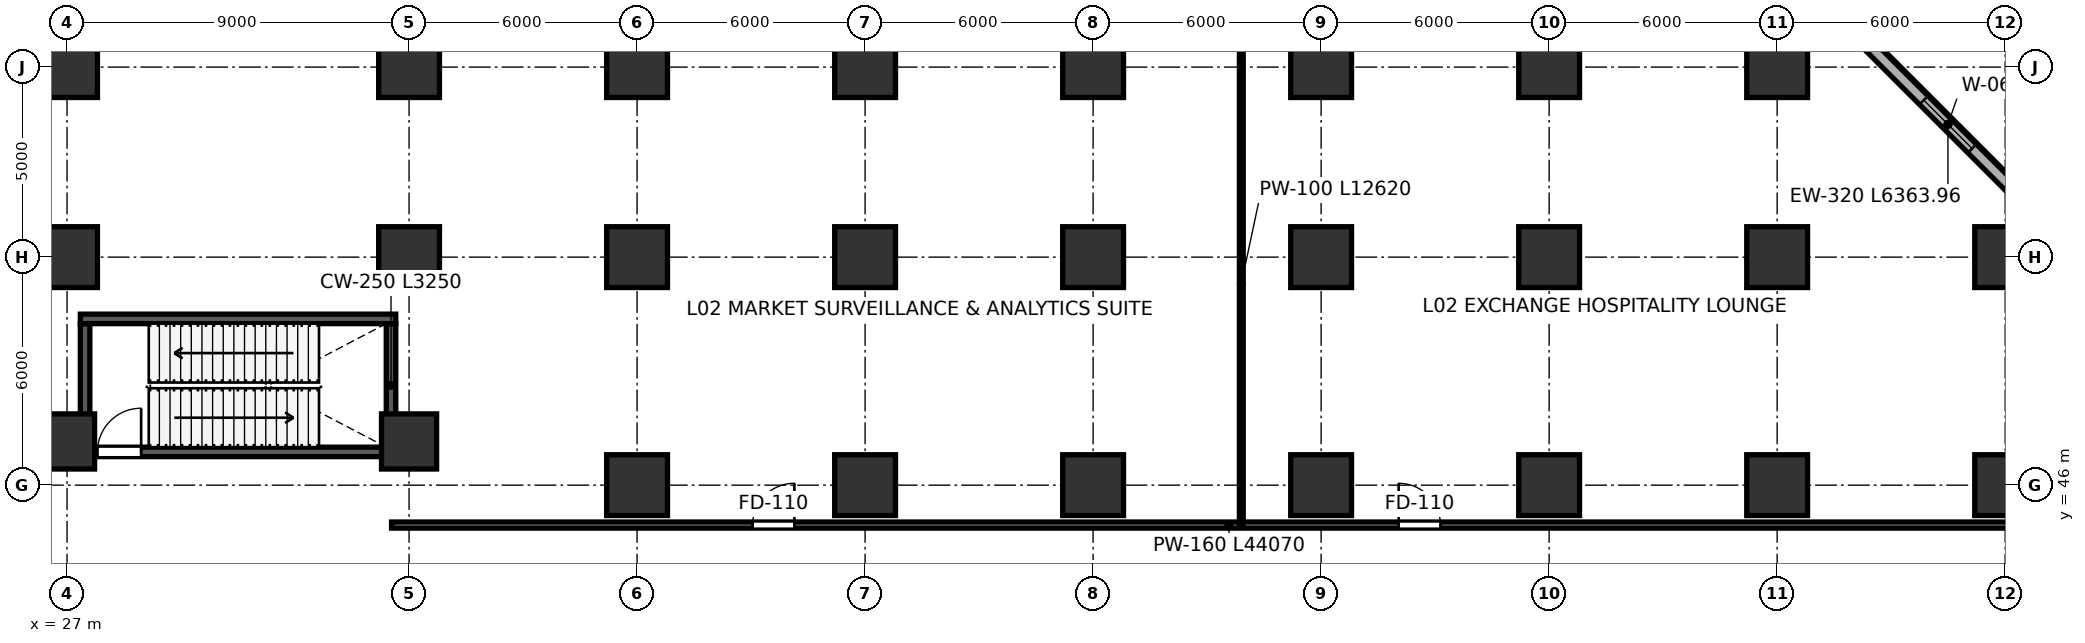
"""IFC4 building model, lengths in metres.
Left out: names, types, materials, properties, quantities, classifications, styles, units other than length and angle.
Written with IfcOpenShell. Run it as: python <this file> out.ifc"""

import sys

from ifc_helpers import new_model, si_unit, direction, frame, frame_2d, origin, origin_2d, place, context, subcontext, project, spatial, rectangle, extrude, source, transform, mapped, element, fill, save


model = new_model("IFC4")
c1 = context("Model", 3, precision=1e-05, world=origin(), true_north=direction((0.0, 1.0)))
c2 = subcontext(c1, "Body", "Model", "MODEL_VIEW")
j1 = project(units=[si_unit("LENGTHUNIT", "METRE"), si_unit("PLANEANGLEUNIT", "RADIAN")], contexts=[c1])
p1 = place(None, origin())
s1 = spatial("IfcSite", under=j1, at=p1, CompositionType="ELEMENT")
p2 = place(p1, origin())
s2 = spatial("IfcBuilding", under=s1, at=p2, CompositionType="ELEMENT")
p3 = place(p2, frame((0.0, 0.0, 6.0)))
s3 = spatial("IfcBuildingStorey", under=s2, at=p3, CompositionType="ELEMENT", Elevation=6.0)
m1 = source(origin(), c2, "Body", "SweptSolid", [
    extrude(rectangle(XDim=1.6, YDim=1.6, at=origin_2d()), origin(), (0.0, 0.0, 1.0), 5.999),
])
p4 = place(p3, frame((27.0, 52.0, 0.001), z_axis=(0.0, 0.0, 1.0), x_axis=(1.0, 0.0, 0.0)))
e1 = element("IfcColumn", 1, at=p4, inside=s3, PredefinedType="COLUMN", context=c2, shape_type="MappedRepresentation", body=[
    mapped(m1, transform((0.0, 0.0, 0.0), scale=1.0)),
])
m2 = source(origin(), c2, "Body", "SweptSolid", [
    extrude(rectangle(XDim=1.6, YDim=1.6, at=origin_2d()), origin(), (0.0, 0.0, 1.0), 5.999),
])
p5 = place(p3, frame((27.0, 57.0, 0.001), z_axis=(0.0, 0.0, 1.0), x_axis=(1.0, 0.0, 0.0)))
e2 = element("IfcColumn", 2, at=p5, inside=s3, PredefinedType="COLUMN", context=c2, shape_type="MappedRepresentation", body=[
    mapped(m2, transform((0.0, 0.0, 0.0), scale=1.0)),
])
m3 = source(origin(), c2, "Body", "SweptSolid", [
    extrude(rectangle(XDim=1.45, YDim=1.45, at=origin_2d()), origin(), (0.0, 0.0, 1.0), 5.999),
])
p6 = place(p3, frame((27.0, 47.15, 0.001), z_axis=(0.0, 0.0, 1.0), x_axis=(1.0, 0.0, 0.0)))
e3 = element("IfcColumn", 3, at=p6, inside=s3, PredefinedType="COLUMN", context=c2, shape_type="MappedRepresentation", body=[
    mapped(m3, transform((0.0, 0.0, 0.0), scale=1.0)),
])
p7 = place(p3, frame((36.0, 52.0, 0.001), z_axis=(0.0, 0.0, 1.0), x_axis=(1.0, 0.0, 0.0)))
e4 = element("IfcColumn", 4, at=p7, inside=s3, PredefinedType="COLUMN", context=c2, shape_type="MappedRepresentation", body=[
    mapped(m1, transform((0.0, 0.0, 0.0), scale=1.0)),
])
p8 = place(p3, frame((36.0, 57.0, 0.001), z_axis=(0.0, 0.0, 1.0), x_axis=(1.0, 0.0, 0.0)))
e5 = element("IfcColumn", 5, at=p8, inside=s3, PredefinedType="COLUMN", context=c2, shape_type="MappedRepresentation", body=[
    mapped(m2, transform((0.0, 0.0, 0.0), scale=1.0)),
])
p9 = place(p3, frame((36.0, 47.15, 0.001), z_axis=(0.0, 0.0, 1.0), x_axis=(1.0, 0.0, 0.0)))
e6 = element("IfcColumn", 6, at=p9, inside=s3, PredefinedType="COLUMN", context=c2, shape_type="MappedRepresentation", body=[
    mapped(m3, transform((0.0, 0.0, 0.0), scale=1.0)),
])
for number, where, z_axis, x_axis in (
    (7, (42.0, 46.0, 0.001), (0.0, 0.0, 1.0), (1.0, 0.0, 0.0)),
    (8, (42.0, 52.0, 0.001), (0.0, 0.0, 1.0), (1.0, 0.0, 0.0)),
):
    element("IfcColumn", number, at=place(p3, frame(where, z_axis=z_axis, x_axis=x_axis)), inside=s3, PredefinedType="COLUMN", context=c2, shape_type="MappedRepresentation", body=[
        mapped(m1, transform((0.0, 0.0, 0.0), scale=1.0)),
    ])
p10 = place(p3, frame((42.0, 57.0, 0.001), z_axis=(0.0, 0.0, 1.0), x_axis=(1.0, 0.0, 0.0)))
e9 = element("IfcColumn", 9, at=p10, inside=s3, PredefinedType="COLUMN", context=c2, shape_type="MappedRepresentation", body=[
    mapped(m2, transform((0.0, 0.0, 0.0), scale=1.0)),
])
for number, where, z_axis, x_axis in (
    (10, (48.0, 46.0, 0.001), (0.0, 0.0, 1.0), (1.0, 0.0, 0.0)),
    (11, (48.0, 52.0, 0.001), (0.0, 0.0, 1.0), (1.0, 0.0, 0.0)),
):
    element("IfcColumn", number, at=place(p3, frame(where, z_axis=z_axis, x_axis=x_axis)), inside=s3, PredefinedType="COLUMN", context=c2, shape_type="MappedRepresentation", body=[
        mapped(m1, transform((0.0, 0.0, 0.0), scale=1.0)),
    ])
p11 = place(p3, frame((48.0, 57.0, 0.001), z_axis=(0.0, 0.0, 1.0), x_axis=(1.0, 0.0, 0.0)))
e12 = element("IfcColumn", 12, at=p11, inside=s3, PredefinedType="COLUMN", context=c2, shape_type="MappedRepresentation", body=[
    mapped(m2, transform((0.0, 0.0, 0.0), scale=1.0)),
])
for number, where, z_axis, x_axis in (
    (13, (54.0, 46.0, 0.001), (0.0, 0.0, 1.0), (1.0, 0.0, 0.0)),
    (14, (54.0, 52.0, 0.001), (0.0, 0.0, 1.0), (1.0, 0.0, 0.0)),
):
    element("IfcColumn", number, at=place(p3, frame(where, z_axis=z_axis, x_axis=x_axis)), inside=s3, PredefinedType="COLUMN", context=c2, shape_type="MappedRepresentation", body=[
        mapped(m1, transform((0.0, 0.0, 0.0), scale=1.0)),
    ])
p12 = place(p3, frame((54.0, 57.0, 0.001), z_axis=(0.0, 0.0, 1.0), x_axis=(1.0, 0.0, 0.0)))
e15 = element("IfcColumn", 15, at=p12, inside=s3, PredefinedType="COLUMN", context=c2, shape_type="MappedRepresentation", body=[
    mapped(m2, transform((0.0, 0.0, 0.0), scale=1.0)),
])
for number, where, z_axis, x_axis in (
    (16, (60.0, 46.0, 0.001), (0.0, 0.0, 1.0), (1.0, 0.0, 0.0)),
    (17, (60.0, 52.0, 0.001), (0.0, 0.0, 1.0), (1.0, 0.0, 0.0)),
):
    element("IfcColumn", number, at=place(p3, frame(where, z_axis=z_axis, x_axis=x_axis)), inside=s3, PredefinedType="COLUMN", context=c2, shape_type="MappedRepresentation", body=[
        mapped(m1, transform((0.0, 0.0, 0.0), scale=1.0)),
    ])
p13 = place(p3, frame((60.0, 57.0, 0.001), z_axis=(0.0, 0.0, 1.0), x_axis=(1.0, 0.0, 0.0)))
e18 = element("IfcColumn", 18, at=p13, inside=s3, PredefinedType="COLUMN", context=c2, shape_type="MappedRepresentation", body=[
    mapped(m2, transform((0.0, 0.0, 0.0), scale=1.0)),
])
for number, where, z_axis, x_axis in (
    (19, (66.0, 46.0, 0.001), (0.0, 0.0, 1.0), (1.0, 0.0, 0.0)),
    (20, (66.0, 52.0, 0.001), (0.0, 0.0, 1.0), (1.0, 0.0, 0.0)),
):
    element("IfcColumn", number, at=place(p3, frame(where, z_axis=z_axis, x_axis=x_axis)), inside=s3, PredefinedType="COLUMN", context=c2, shape_type="MappedRepresentation", body=[
        mapped(m1, transform((0.0, 0.0, 0.0), scale=1.0)),
    ])
p14 = place(p3, frame((66.0, 57.0, 0.001), z_axis=(0.0, 0.0, 1.0), x_axis=(1.0, 0.0, 0.0)))
e21 = element("IfcColumn", 21, at=p14, inside=s3, PredefinedType="COLUMN", context=c2, shape_type="MappedRepresentation", body=[
    mapped(m2, transform((0.0, 0.0, 0.0), scale=1.0)),
])
for number, where, z_axis, x_axis in (
    (22, (72.0, 46.0, 0.001), (0.0, 0.0, 1.0), (1.0, 0.0, 0.0)),
    (23, (72.0, 52.0, 0.001), (0.0, 0.0, 1.0), (1.0, 0.0, 0.0)),
):
    element("IfcColumn", number, at=place(p3, frame(where, z_axis=z_axis, x_axis=x_axis)), inside=s3, PredefinedType="COLUMN", context=c2, shape_type="MappedRepresentation", body=[
        mapped(m1, transform((0.0, 0.0, 0.0), scale=1.0)),
    ])
for number, where, z_axis, x_axis in (
    (24, (72.0, 57.0, 0.001), (0.0, 0.0, 1.0), (1.0, 0.0, 0.0)),
    (25, (78.0, 46.0, 0.001), (0.0, 0.0, 1.0), (1.0, 0.0, 0.0)),
    (26, (78.0, 52.0, 0.001), (0.0, 0.0, 1.0), (1.0, 0.0, 0.0)),
):
    element("IfcColumn", number, at=place(p3, frame(where, z_axis=z_axis, x_axis=x_axis)), inside=s3, PredefinedType="COLUMN", context=c2, shape_type="MappedRepresentation", body=[
        mapped(m2, transform((0.0, 0.0, 0.0), scale=1.0)),
    ])
p15 = place(p3, frame((78.744, 53.244, 0.0), z_axis=(0.0, 0.0, 1.0), x_axis=(-0.707106781187, 0.707106781187, 0.0)))
e27 = element("IfcWall", 27, at=p15, inside=s3, PredefinedType="SOLIDWALL", context=c2, shape_type="SweptSolid", body=[
    extrude(rectangle(XDim=6.364, YDim=0.32, at=frame_2d((3.182, 0.0))), origin(), (0.0, 0.0, 1.0), 5.74),
])
p16 = place(p15, frame((2.282, 0.0, 0.65)))
e28 = element("IfcOpeningElement", 28, at=p16, cuts=e27, PredefinedType="OPENING", context=c2, shape_type="SweptSolid", body=[
    extrude(rectangle(XDim=1.8, YDim=2.1, at=frame_2d((0.9, 1.05))), frame((0.0, 0.17, 0.0), z_axis=(0.0, -1.0, 0.0), x_axis=(1.0, 0.0, 0.0)), (0.0, 0.0, 1.0), 0.34),
])
for number, where, z_axis, x_axis in (
    (29, (27.475, 47.0, 0.0), (0.0, 0.0, 1.0), (0.0, 1.0, 0.0)),
    (30, (35.525, 47.0, 0.0), (0.0, 0.0, 1.0), (0.0, 1.0, 0.0)),
):
    element("IfcWall", number, at=place(p3, frame(where, z_axis=z_axis, x_axis=x_axis)), inside=s3, PredefinedType="SHEAR", context=c2, shape_type="SweptSolid", body=[
        extrude(rectangle(XDim=3.25, YDim=0.25, at=frame_2d((1.625, 0.0))), origin(), (0.0, 0.0, 1.0), 5.74),
    ])
p17 = place(p3, frame((27.35, 46.875, 0.0), z_axis=(0.0, 0.0, 1.0), x_axis=(1.0, 0.0, 0.0)))
e31 = element("IfcWall", 31, at=p17, inside=s3, PredefinedType="SHEAR", context=c2, shape_type="SweptSolid", body=[
    extrude(rectangle(XDim=8.3, YDim=0.25, at=frame_2d((4.15, 0.0))), origin(), (0.0, 0.0, 1.0), 5.74),
])
p18 = place(p17, frame((0.45, 0.0, 0.0)))
e32 = element("IfcOpeningElement", 32, at=p18, cuts=e31, PredefinedType="OPENING", context=c2, shape_type="SweptSolid", body=[
    extrude(rectangle(XDim=1.15, YDim=2.2, at=frame_2d((0.575, 1.1))), frame((0.0, 0.135, 0.0), z_axis=(0.0, -1.0, 0.0), x_axis=(1.0, 0.0, 0.0)), (0.0, 0.0, 1.0), 0.27),
])
p19 = place(p3, frame((27.35, 50.375, 0.0), z_axis=(0.0, 0.0, 1.0), x_axis=(1.0, 0.0, 0.0)))
e33 = element("IfcWall", 33, at=p19, inside=s3, PredefinedType="SHEAR", context=c2, shape_type="SweptSolid", body=[
    extrude(rectangle(XDim=8.3, YDim=0.25, at=frame_2d((4.15, 0.0))), origin(), (0.0, 0.0, 1.0), 5.74),
])
p20 = place(p3, frame((35.54, 44.95, 0.0), z_axis=(0.0, 0.0, 1.0), x_axis=(1.0, 0.0, 0.0)))
e34 = element("IfcWall", 34, at=p20, inside=s3, PredefinedType="PARTITIONING", context=c2, shape_type="SweptSolid", body=[
    extrude(rectangle(XDim=44.07, YDim=0.16, at=frame_2d((22.035, 0.0))), origin(), (0.0, 0.0, 1.0), 4.875),
])
p21 = place(p20, frame((9.5, 0.0, 0.0)))
e35 = element("IfcOpeningElement", 35, at=p21, cuts=e34, PredefinedType="OPENING", context=c2, shape_type="SweptSolid", body=[
    extrude(rectangle(XDim=1.1, YDim=2.2, at=frame_2d((0.55, 1.1))), frame((0.0, 0.09, 0.0), z_axis=(0.0, -1.0, 0.0), x_axis=(1.0, 0.0, 0.0)), (0.0, 0.0, 1.0), 0.18),
])
p22 = place(p20, frame((26.5, 0.0, 0.0)))
e36 = element("IfcOpeningElement", 36, at=p22, cuts=e34, PredefinedType="OPENING", context=c2, shape_type="SweptSolid", body=[
    extrude(rectangle(XDim=1.1, YDim=2.2, at=frame_2d((0.55, 1.1))), frame((0.0, 0.09, 0.0), z_axis=(0.0, -1.0, 0.0), x_axis=(1.0, 0.0, 0.0)), (0.0, 0.0, 1.0), 0.18),
])
p23 = place(p3, frame((57.9, 44.99, 0.0), z_axis=(0.0, 0.0, 1.0), x_axis=(0.0, 1.0, 0.0)))
e37 = element("IfcWall", 37, at=p23, inside=s3, PredefinedType="PARTITIONING", context=c2, shape_type="SweptSolid", body=[
    extrude(rectangle(XDim=12.62, YDim=0.1, at=frame_2d((6.31, 0.0))), origin(), (0.0, 0.0, 1.0), 4.875),
])
m4 = source(origin(), c2, "Body", "SweptSolid", [
    extrude(rectangle(XDim=1.8, YDim=2.1, at=frame_2d((0.9, 1.05))), frame((0.0, 0.03, 0.0), z_axis=(0.0, -1.0, 0.0), x_axis=(1.0, 0.0, 0.0)), (0.0, 0.0, 1.0), 0.06),
])
p24 = place(p16, origin())
e38 = element("IfcWindow", 38, at=p24, inside=s3, PartitioningType="SINGLE_PANEL", PredefinedType="WINDOW", context=c2, shape_type="MappedRepresentation", body=[
    mapped(m4, transform((0.0, 0.0, 0.0), scale=1.0)),
])
fill(e28, e38)
m5 = source(origin(), c2, "Body", "SweptSolid", [
    extrude(rectangle(XDim=1.15, YDim=2.2, at=frame_2d((0.575, 1.1))), frame((0.0, 0.025, 0.0), z_axis=(0.0, -1.0, 0.0), x_axis=(1.0, 0.0, 0.0)), (0.0, 0.0, 1.0), 0.05),
])
p25 = place(p18, origin())
e39 = element("IfcDoor", 39, at=p25, inside=s3, OperationType="SINGLE_SWING_RIGHT", PredefinedType="DOOR", context=c2, shape_type="MappedRepresentation", body=[
    mapped(m5, transform((0.0, 0.0, 0.0), scale=1.0)),
])
fill(e32, e39)
m6 = source(origin(), c2, "Body", "SweptSolid", [
    extrude(rectangle(XDim=1.1, YDim=2.2, at=frame_2d((0.55, 1.1))), frame((0.0, 0.025, 0.0), z_axis=(0.0, -1.0, 0.0), x_axis=(1.0, 0.0, 0.0)), (0.0, 0.0, 1.0), 0.05),
])
p26 = place(p21, origin())
e40 = element("IfcDoor", 40, at=p26, inside=s3, OperationType="SINGLE_SWING_RIGHT", PredefinedType="DOOR", context=c2, shape_type="MappedRepresentation", body=[
    mapped(m6, transform((0.0, 0.0, 0.0), scale=1.0)),
])
fill(e35, e40)
p27 = place(p22, origin())
e41 = element("IfcDoor", 41, at=p27, inside=s3, OperationType="SINGLE_SWING_LEFT", PredefinedType="DOOR", context=c2, shape_type="MappedRepresentation", body=[
    mapped(m6, transform((0.0, 0.0, 0.0), scale=1.0)),
])
fill(e36, e41)
save(model, sys.argv[1])
